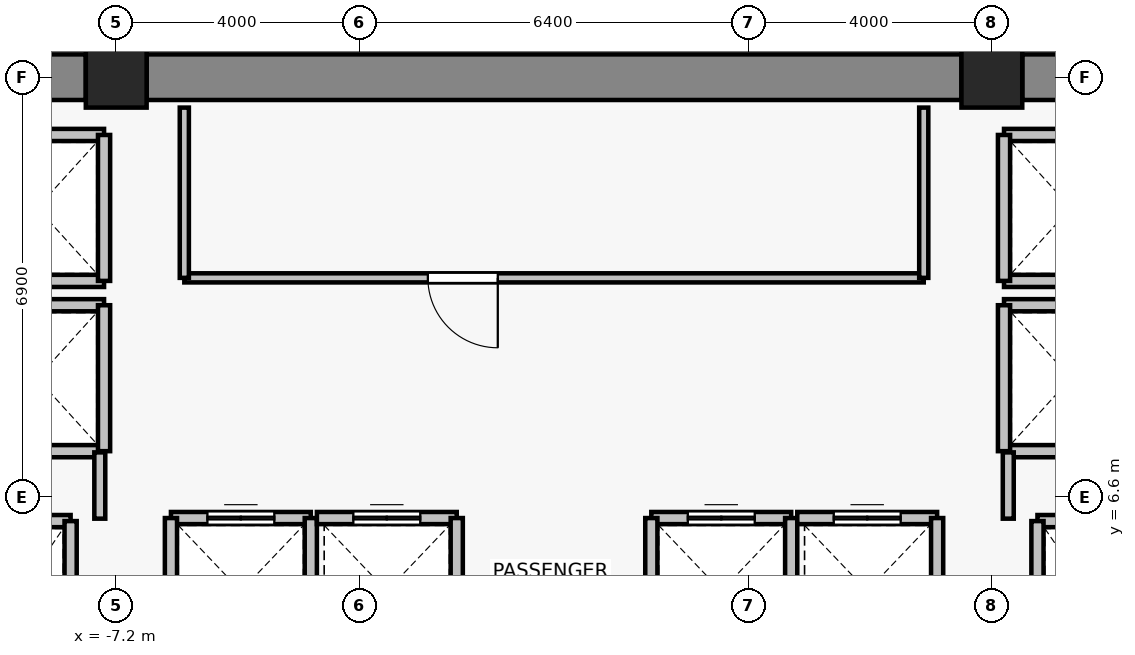
"""IFC4 building model, lengths in metres.
Left out: names, types, materials, properties, quantities, classifications, styles, units other than length and angle.
Written with IfcOpenShell. Run it as: python <this file> out.ifc"""

import sys

from ifc_helpers import new_model, si_unit, direction, frame, frame_2d, origin, origin_2d, place, context, subcontext, project, spatial, rectangle, extrude, source, transform, mapped, element, fill, save


model = new_model("IFC4")
c1 = context("Model", 3, precision=1e-05, world=origin(), true_north=direction((0.0, 1.0)))
c2 = subcontext(c1, "Body", "Model", "MODEL_VIEW")
j1 = project(units=[si_unit("LENGTHUNIT", "METRE"), si_unit("PLANEANGLEUNIT", "RADIAN")], contexts=[c1])
p1 = place(None, origin())
s1 = spatial("IfcSite", under=j1, at=p1, CompositionType="ELEMENT")
p2 = place(p1, origin())
s2 = spatial("IfcBuilding", under=s1, at=p2, CompositionType="ELEMENT")
p3 = place(p2, frame((0.0, 0.0, 123.1)))
s3 = spatial("IfcBuildingStorey", under=s2, at=p3, CompositionType="ELEMENT", Elevation=123.1)
for number, where, z_axis, x_axis in (
    (1, (-7.2, 13.5, 0.0), (0.0, 0.0, 1.0), (1.0, 0.0, 0.0)),
    (2, (7.2, 13.5, 0.0), (0.0, 0.0, 1.0), (1.0, 0.0, 0.0)),
):
    element("IfcColumn", number, at=place(p3, frame(where, z_axis=z_axis, x_axis=x_axis)), inside=s3, PredefinedType="COLUMN", context=c2, shape_type="SweptSolid", body=[
        extrude(rectangle(XDim=1.0, YDim=1.0, at=origin_2d()), origin(), (0.0, 0.0, 1.0), 3.3),
    ])
p4 = place(p3, frame((-13.9, 13.5, 0.0), z_axis=(0.0, 0.0, 1.0), x_axis=(1.0, 0.0, 0.0)))
e3 = element("IfcWall", 3, at=p4, inside=s3, PredefinedType="SHEAR", context=c2, shape_type="SweptSolid", body=[
    extrude(rectangle(XDim=6.2, YDim=0.75, at=frame_2d((3.1, 0.0))), origin(), (0.0, 0.0, 1.0), 3.075),
])
p5 = place(p3, frame((-6.7, 13.5, 0.0), z_axis=(0.0, 0.0, 1.0), x_axis=(1.0, 0.0, 0.0)))
e4 = element("IfcWall", 4, at=p5, inside=s3, PredefinedType="SHEAR", context=c2, shape_type="SweptSolid", body=[
    extrude(rectangle(XDim=13.4, YDim=0.75, at=frame_2d((6.7, 0.0))), origin(), (0.0, 0.0, 1.0), 3.075),
])
p6 = place(p3, frame((7.7, 13.5, 0.0), z_axis=(0.0, 0.0, 1.0), x_axis=(1.0, 0.0, 0.0)))
e5 = element("IfcWall", 5, at=p6, inside=s3, PredefinedType="SHEAR", context=c2, shape_type="SweptSolid", body=[
    extrude(rectangle(XDim=6.2, YDim=0.75, at=frame_2d((3.1, 0.0))), origin(), (0.0, 0.0, 1.0), 3.075),
])
p7 = place(p3, frame((-9.95, 6.2, 0.0), z_axis=(0.0, 0.0, 1.0), x_axis=(1.0, 0.0, 0.0)))
e6 = element("IfcWall", 6, at=p7, inside=s3, PredefinedType="SOLIDWALL", context=c2, shape_type="SweptSolid", body=[
    extrude(rectangle(XDim=2.0, YDim=0.2, at=frame_2d((1.0, 0.0))), origin(), (0.0, 0.0, 1.0), 3.075),
])
p8 = place(p3, frame((-7.95, 6.2, 0.0), z_axis=(0.0, 0.0, 1.0), x_axis=(0.0, -1.0, 0.0)))
e7 = element("IfcWall", 7, at=p8, inside=s3, PredefinedType="SOLIDWALL", context=c2, shape_type="SweptSolid", body=[
    extrude(rectangle(XDim=2.8, YDim=0.2, at=frame_2d((1.4, 0.0))), origin(), (0.0, 0.0, 1.0), 3.075),
])
p9 = place(p3, frame((7.95, 6.2, 0.0), z_axis=(0.0, 0.0, 1.0), x_axis=(1.0, 0.0, 0.0)))
e8 = element("IfcWall", 8, at=p9, inside=s3, PredefinedType="SOLIDWALL", context=c2, shape_type="SweptSolid", body=[
    extrude(rectangle(XDim=2.0, YDim=0.2, at=frame_2d((1.0, 0.0))), origin(), (0.0, 0.0, 1.0), 3.075),
])
p10 = place(p3, frame((7.95, 3.4, 0.0), z_axis=(0.0, 0.0, 1.0), x_axis=(0.0, 1.0, 0.0)))
e9 = element("IfcWall", 9, at=p10, inside=s3, PredefinedType="SOLIDWALL", context=c2, shape_type="SweptSolid", body=[
    extrude(rectangle(XDim=2.8, YDim=0.2, at=frame_2d((1.4, 0.0))), origin(), (0.0, 0.0, 1.0), 3.075),
])
p11 = place(p3, frame((-6.3, 6.25, 0.0), z_axis=(0.0, 0.0, 1.0), x_axis=(1.0, 0.0, 0.0)))
e10 = element("IfcWall", 10, at=p11, inside=s3, PredefinedType="SOLIDWALL", context=c2, shape_type="SweptSolid", body=[
    extrude(rectangle(XDim=2.3, YDim=0.2, at=frame_2d((1.15, 0.0))), origin(), (0.0, 0.0, 1.0), 3.075),
])
p12 = place(p11, frame((0.6, 0.0, 0.0)))
e11 = element("IfcOpeningElement", 11, at=p12, cuts=e10, PredefinedType="OPENING", context=c2, shape_type="SweptSolid", body=[
    extrude(rectangle(XDim=1.1, YDim=2.2, at=frame_2d((0.55, 1.1))), frame((0.0, 0.11, 0.0), z_axis=(0.0, -1.0, 0.0), x_axis=(1.0, 0.0, 0.0)), (0.0, 0.0, 1.0), 0.22),
])
for number, where, z_axis, x_axis in (
    (12, (-6.3, 3.85, 0.0), (0.0, 0.0, 1.0), (0.0, 1.0, 0.0)),
    (13, (-4.0, 6.25, 0.0), (0.0, 0.0, 1.0), (0.0, -1.0, 0.0)),
):
    element("IfcWall", number, at=place(p3, frame(where, z_axis=z_axis, x_axis=x_axis)), inside=s3, PredefinedType="SOLIDWALL", context=c2, shape_type="SweptSolid", body=[
        extrude(rectangle(XDim=2.4, YDim=0.2, at=frame_2d((1.2, 0.0))), origin(), (0.0, 0.0, 1.0), 3.075),
    ])
p13 = place(p3, frame((-3.9, 6.25, 0.0), z_axis=(0.0, 0.0, 1.0), x_axis=(1.0, 0.0, 0.0)))
e14 = element("IfcWall", 14, at=p13, inside=s3, PredefinedType="SOLIDWALL", context=c2, shape_type="SweptSolid", body=[
    extrude(rectangle(XDim=2.3, YDim=0.2, at=frame_2d((1.15, 0.0))), origin(), (0.0, 0.0, 1.0), 3.075),
])
p14 = place(p13, frame((0.6, 0.0, 0.0)))
e15 = element("IfcOpeningElement", 15, at=p14, cuts=e14, PredefinedType="OPENING", context=c2, shape_type="SweptSolid", body=[
    extrude(rectangle(XDim=1.1, YDim=2.2, at=frame_2d((0.55, 1.1))), frame((0.0, 0.11, 0.0), z_axis=(0.0, -1.0, 0.0), x_axis=(1.0, 0.0, 0.0)), (0.0, 0.0, 1.0), 0.22),
])
p15 = place(p3, frame((-1.6, 6.25, 0.0), z_axis=(0.0, 0.0, 1.0), x_axis=(0.0, -1.0, 0.0)))
e16 = element("IfcWall", 16, at=p15, inside=s3, PredefinedType="SOLIDWALL", context=c2, shape_type="SweptSolid", body=[
    extrude(rectangle(XDim=2.4, YDim=0.2, at=frame_2d((1.2, 0.0))), origin(), (0.0, 0.0, 1.0), 3.075),
])
p16 = place(p3, frame((1.6, 6.25, 0.0), z_axis=(0.0, 0.0, 1.0), x_axis=(1.0, 0.0, 0.0)))
e17 = element("IfcWall", 17, at=p16, inside=s3, PredefinedType="SOLIDWALL", context=c2, shape_type="SweptSolid", body=[
    extrude(rectangle(XDim=2.3, YDim=0.2, at=frame_2d((1.15, 0.0))), origin(), (0.0, 0.0, 1.0), 3.075),
])
p17 = place(p16, frame((0.6, 0.0, 0.0)))
e18 = element("IfcOpeningElement", 18, at=p17, cuts=e17, PredefinedType="OPENING", context=c2, shape_type="SweptSolid", body=[
    extrude(rectangle(XDim=1.1, YDim=2.2, at=frame_2d((0.55, 1.1))), frame((0.0, 0.11, 0.0), z_axis=(0.0, -1.0, 0.0), x_axis=(1.0, 0.0, 0.0)), (0.0, 0.0, 1.0), 0.22),
])
for number, where, z_axis, x_axis in (
    (19, (1.6, 3.85, 0.0), (0.0, 0.0, 1.0), (0.0, 1.0, 0.0)),
    (20, (3.9, 6.25, 0.0), (0.0, 0.0, 1.0), (0.0, -1.0, 0.0)),
):
    element("IfcWall", number, at=place(p3, frame(where, z_axis=z_axis, x_axis=x_axis)), inside=s3, PredefinedType="SOLIDWALL", context=c2, shape_type="SweptSolid", body=[
        extrude(rectangle(XDim=2.4, YDim=0.2, at=frame_2d((1.2, 0.0))), origin(), (0.0, 0.0, 1.0), 3.075),
    ])
p18 = place(p3, frame((4.0, 6.25, 0.0), z_axis=(0.0, 0.0, 1.0), x_axis=(1.0, 0.0, 0.0)))
e21 = element("IfcWall", 21, at=p18, inside=s3, PredefinedType="SOLIDWALL", context=c2, shape_type="SweptSolid", body=[
    extrude(rectangle(XDim=2.3, YDim=0.2, at=frame_2d((1.15, 0.0))), origin(), (0.0, 0.0, 1.0), 3.075),
])
p19 = place(p18, frame((0.6, 0.0, 0.0)))
e22 = element("IfcOpeningElement", 22, at=p19, cuts=e21, PredefinedType="OPENING", context=c2, shape_type="SweptSolid", body=[
    extrude(rectangle(XDim=1.1, YDim=2.2, at=frame_2d((0.55, 1.1))), frame((0.0, 0.11, 0.0), z_axis=(0.0, -1.0, 0.0), x_axis=(1.0, 0.0, 0.0)), (0.0, 0.0, 1.0), 0.22),
])
p20 = place(p3, frame((6.3, 6.25, 0.0), z_axis=(0.0, 0.0, 1.0), x_axis=(0.0, -1.0, 0.0)))
e23 = element("IfcWall", 23, at=p20, inside=s3, PredefinedType="SOLIDWALL", context=c2, shape_type="SweptSolid", body=[
    extrude(rectangle(XDim=2.4, YDim=0.2, at=frame_2d((1.2, 0.0))), origin(), (0.0, 0.0, 1.0), 3.075),
])
for number, where, z_axis, x_axis in (
    (24, (-7.4, 7.35, 0.0), (0.0, 0.0, 1.0), (-1.0, 0.0, 0.0)),
    (25, (-9.6, 9.75, 0.0), (0.0, 0.0, 1.0), (1.0, 0.0, 0.0)),
):
    element("IfcWall", number, at=place(p3, frame(where, z_axis=z_axis, x_axis=x_axis)), inside=s3, PredefinedType="SOLIDWALL", context=c2, shape_type="SweptSolid", body=[
        extrude(rectangle(XDim=2.2, YDim=0.2, at=frame_2d((1.1, 0.0))), origin(), (0.0, 0.0, 1.0), 2.515),
    ])
p21 = place(p3, frame((-7.4, 9.75, 0.0), z_axis=(0.0, 0.0, 1.0), x_axis=(0.0, -1.0, 0.0)))
e26 = element("IfcWall", 26, at=p21, inside=s3, PredefinedType="SOLIDWALL", context=c2, shape_type="SweptSolid", body=[
    extrude(rectangle(XDim=2.4, YDim=0.2, at=frame_2d((1.2, 0.0))), origin(), (0.0, 0.0, 1.0), 2.515),
])
for number, where, z_axis, x_axis in (
    (27, (-7.4, 10.15, 0.0), (0.0, 0.0, 1.0), (-1.0, 0.0, 0.0)),
    (28, (-9.6, 12.55, 0.0), (0.0, 0.0, 1.0), (1.0, 0.0, 0.0)),
):
    element("IfcWall", number, at=place(p3, frame(where, z_axis=z_axis, x_axis=x_axis)), inside=s3, PredefinedType="SOLIDWALL", context=c2, shape_type="SweptSolid", body=[
        extrude(rectangle(XDim=2.2, YDim=0.2, at=frame_2d((1.1, 0.0))), origin(), (0.0, 0.0, 1.0), 2.515),
    ])
p22 = place(p3, frame((-7.4, 12.55, 0.0), z_axis=(0.0, 0.0, 1.0), x_axis=(0.0, -1.0, 0.0)))
e29 = element("IfcWall", 29, at=p22, inside=s3, PredefinedType="SOLIDWALL", context=c2, shape_type="SweptSolid", body=[
    extrude(rectangle(XDim=2.4, YDim=0.2, at=frame_2d((1.2, 0.0))), origin(), (0.0, 0.0, 1.0), 2.515),
])
for number, where, z_axis, x_axis in (
    (30, (9.6, 7.35, 0.0), (0.0, 0.0, 1.0), (-1.0, 0.0, 0.0)),
    (31, (7.4, 9.75, 0.0), (0.0, 0.0, 1.0), (1.0, 0.0, 0.0)),
):
    element("IfcWall", number, at=place(p3, frame(where, z_axis=z_axis, x_axis=x_axis)), inside=s3, PredefinedType="SOLIDWALL", context=c2, shape_type="SweptSolid", body=[
        extrude(rectangle(XDim=2.2, YDim=0.2, at=frame_2d((1.1, 0.0))), origin(), (0.0, 0.0, 1.0), 2.515),
    ])
p23 = place(p3, frame((7.4, 7.35, 0.0), z_axis=(0.0, 0.0, 1.0), x_axis=(0.0, 1.0, 0.0)))
e32 = element("IfcWall", 32, at=p23, inside=s3, PredefinedType="SOLIDWALL", context=c2, shape_type="SweptSolid", body=[
    extrude(rectangle(XDim=2.4, YDim=0.2, at=frame_2d((1.2, 0.0))), origin(), (0.0, 0.0, 1.0), 2.515),
])
for number, where, z_axis, x_axis in (
    (33, (9.6, 10.15, 0.0), (0.0, 0.0, 1.0), (-1.0, 0.0, 0.0)),
    (34, (7.4, 12.55, 0.0), (0.0, 0.0, 1.0), (1.0, 0.0, 0.0)),
):
    element("IfcWall", number, at=place(p3, frame(where, z_axis=z_axis, x_axis=x_axis)), inside=s3, PredefinedType="SOLIDWALL", context=c2, shape_type="SweptSolid", body=[
        extrude(rectangle(XDim=2.2, YDim=0.2, at=frame_2d((1.1, 0.0))), origin(), (0.0, 0.0, 1.0), 2.515),
    ])
p24 = place(p3, frame((7.4, 10.15, 0.0), z_axis=(0.0, 0.0, 1.0), x_axis=(0.0, 1.0, 0.0)))
e35 = element("IfcWall", 35, at=p24, inside=s3, PredefinedType="SOLIDWALL", context=c2, shape_type="SweptSolid", body=[
    extrude(rectangle(XDim=2.4, YDim=0.2, at=frame_2d((1.2, 0.0))), origin(), (0.0, 0.0, 1.0), 2.515),
])
for number, where, z_axis, x_axis in (
    (36, (-7.47, 7.33, 0.0), (0.0, 0.0, 1.0), (0.0, -1.0, 0.0)),
    (37, (7.47, 6.24, 0.0), (0.0, 0.0, 1.0), (0.0, 1.0, 0.0)),
):
    element("IfcWall", number, at=place(p3, frame(where, z_axis=z_axis, x_axis=x_axis)), inside=s3, PredefinedType="PARTITIONING", context=c2, shape_type="SweptSolid", body=[
        extrude(rectangle(XDim=1.09, YDim=0.18, at=frame_2d((0.545, 0.0))), origin(), (0.0, 0.0, 1.0), 2.515),
    ])
p25 = place(p3, frame((6.08, 10.2, 0.0), z_axis=(0.0, 0.0, 1.0), x_axis=(-1.0, 0.0, 0.0)))
e38 = element("IfcWall", 38, at=p25, inside=s3, PredefinedType="PARTITIONING", context=c2, shape_type="SweptSolid", body=[
    extrude(rectangle(XDim=12.16, YDim=0.15, at=frame_2d((6.08, 0.0))), origin(), (0.0, 0.0, 1.0), 3.075),
])
p26 = place(p25, frame((7.005, 0.0, 0.0)))
e39 = element("IfcOpeningElement", 39, at=p26, cuts=e38, PredefinedType="OPENING", context=c2, shape_type="SweptSolid", body=[
    extrude(rectangle(XDim=1.15, YDim=2.15, at=frame_2d((0.575, 1.075))), frame((0.0, 0.085, 0.0), z_axis=(0.0, -1.0, 0.0), x_axis=(1.0, 0.0, 0.0)), (0.0, 0.0, 1.0), 0.17),
])
for number, where, z_axis, x_axis in (
    (40, (-6.08, 10.2, 0.0), (0.0, 0.0, 1.0), (0.0, 1.0, 0.0)),
    (41, (6.08, 13.0, 0.0), (0.0, 0.0, 1.0), (0.0, -1.0, 0.0)),
):
    element("IfcWall", number, at=place(p3, frame(where, z_axis=z_axis, x_axis=x_axis)), inside=s3, PredefinedType="PARTITIONING", context=c2, shape_type="SweptSolid", body=[
        extrude(rectangle(XDim=2.8, YDim=0.15, at=frame_2d((1.4, 0.0))), origin(), (0.0, 0.0, 1.0), 3.075),
    ])
m1 = source(origin(), c2, "Body", "SweptSolid", [
    extrude(rectangle(XDim=1.1, YDim=2.2, at=frame_2d((0.55, 1.1))), frame((0.0, 0.025, 0.0), z_axis=(0.0, -1.0, 0.0), x_axis=(1.0, 0.0, 0.0)), (0.0, 0.0, 1.0), 0.05),
])
p27 = place(p12, origin())
e42 = element("IfcDoor", 42, at=p27, inside=s3, OperationType="DOUBLE_DOOR_SLIDING", PredefinedType="DOOR", context=c2, shape_type="MappedRepresentation", body=[
    mapped(m1, transform((0.0, 0.0, 0.0), x_axis=(1.0, 0.0, 0.0), y_axis=(0.0, 1.0, 0.0), z_axis=(0.0, 0.0, 1.0), scale=1.0)),
])
fill(e11, e42)
p28 = place(p14, origin())
e43 = element("IfcDoor", 43, at=p28, inside=s3, OperationType="DOUBLE_DOOR_SLIDING", PredefinedType="DOOR", context=c2, shape_type="MappedRepresentation", body=[
    mapped(m1, transform((0.0, 0.0, 0.0), x_axis=(1.0, 0.0, 0.0), y_axis=(0.0, 1.0, 0.0), z_axis=(0.0, 0.0, 1.0), scale=1.0)),
])
fill(e15, e43)
p29 = place(p17, origin())
e44 = element("IfcDoor", 44, at=p29, inside=s3, OperationType="DOUBLE_DOOR_SLIDING", PredefinedType="DOOR", context=c2, shape_type="MappedRepresentation", body=[
    mapped(m1, transform((0.0, 0.0, 0.0), x_axis=(1.0, 0.0, 0.0), y_axis=(0.0, 1.0, 0.0), z_axis=(0.0, 0.0, 1.0), scale=1.0)),
])
fill(e18, e44)
p30 = place(p19, origin())
e45 = element("IfcDoor", 45, at=p30, inside=s3, OperationType="DOUBLE_DOOR_SLIDING", PredefinedType="DOOR", context=c2, shape_type="MappedRepresentation", body=[
    mapped(m1, transform((0.0, 0.0, 0.0), x_axis=(1.0, 0.0, 0.0), y_axis=(0.0, 1.0, 0.0), z_axis=(0.0, 0.0, 1.0), scale=1.0)),
])
fill(e22, e45)
m2 = source(origin(), c2, "Body", "SweptSolid", [
    extrude(rectangle(XDim=1.15, YDim=2.15, at=frame_2d((0.575, 1.075))), frame((0.0, 0.025, 0.0), z_axis=(0.0, -1.0, 0.0), x_axis=(1.0, 0.0, 0.0)), (0.0, 0.0, 1.0), 0.05),
])
p31 = place(p26, origin())
e46 = element("IfcDoor", 46, at=p31, inside=s3, OperationType="SINGLE_SWING_LEFT", PredefinedType="DOOR", context=c2, shape_type="MappedRepresentation", body=[
    mapped(m2, transform((0.0, 0.0, 0.0), x_axis=(1.0, 0.0, 0.0), y_axis=(0.0, 1.0, 0.0), z_axis=(0.0, 0.0, 1.0), scale=1.0)),
])
fill(e39, e46)
save(model, sys.argv[1])
